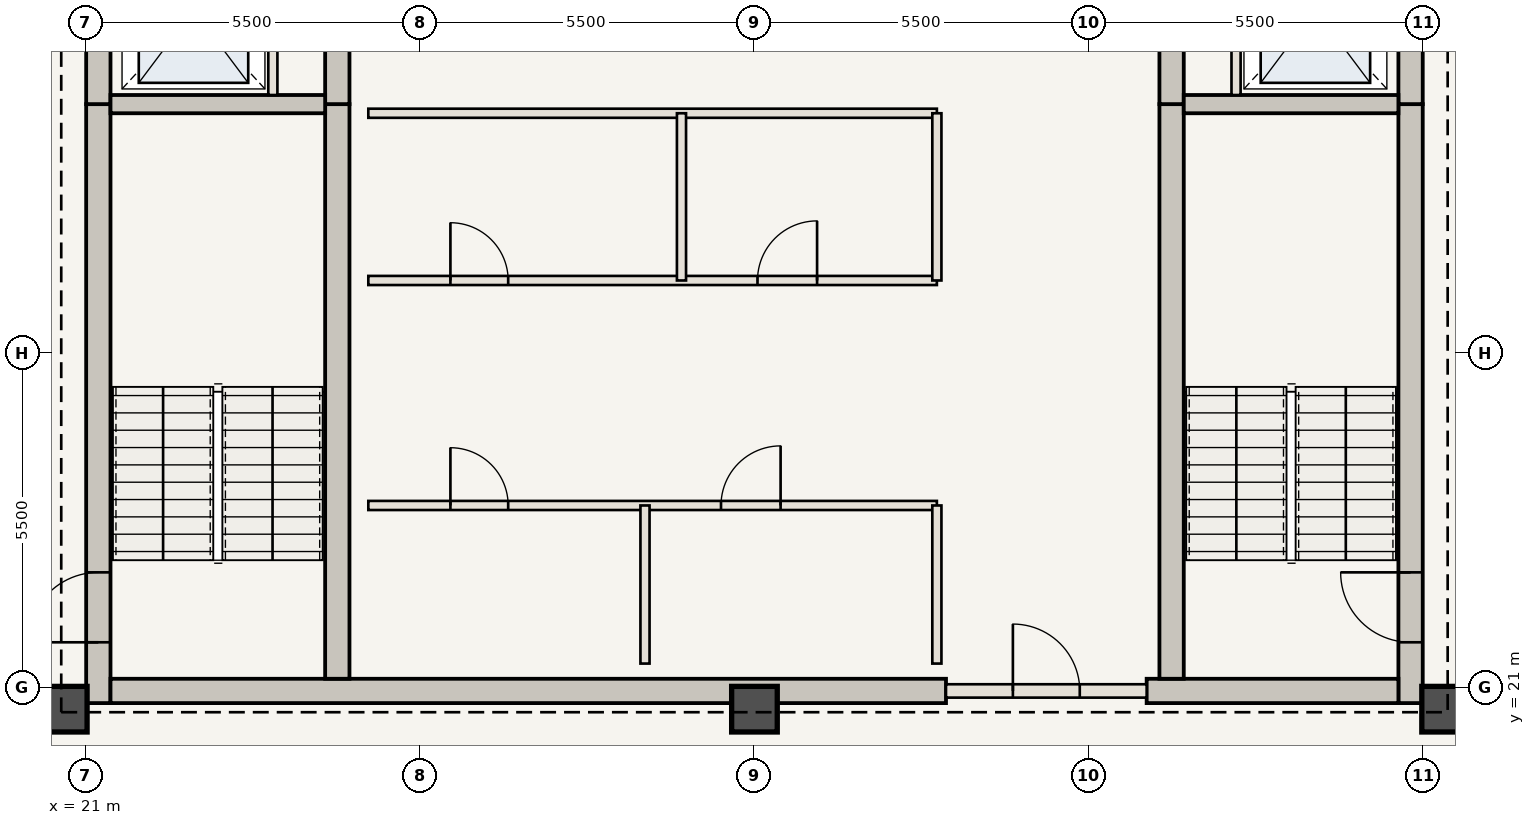
"""IFC4 building model, lengths in metres.
Left out: names, types, materials, properties, quantities, classifications, styles, units other than length and angle.
Written with IfcOpenShell. Run it as: python <this file> out.ifc"""

import sys

from ifc_helpers import new_model, si_unit, direction, frame, frame_2d, origin, origin_2d, place, context, subcontext, project, spatial, rectangle, extrude, element, fill, save


model = new_model("IFC4")
c1 = context("Model", 3, precision=1e-05, world=origin(), true_north=direction((0.0, 1.0)))
c2 = subcontext(c1, "Body", "Model", "MODEL_VIEW")
j1 = project(units=[si_unit("LENGTHUNIT", "METRE"), si_unit("PLANEANGLEUNIT", "RADIAN")], contexts=[c1])
p1 = place(None, origin())
s1 = spatial("IfcSite", under=j1, at=p1, CompositionType="ELEMENT")
p2 = place(p1, origin())
s2 = spatial("IfcBuilding", under=s1, at=p2, CompositionType="ELEMENT")
p3 = place(p2, frame((0.0, 0.0, 262.15)))
s3 = spatial("IfcBuildingStorey", under=s2, at=p3, CompositionType="ELEMENT", Elevation=262.15)
p4 = place(p3, frame((21.21, 20.75, 0.0), z_axis=(0.0, 0.0, 1.0), x_axis=(0.0, 1.0, 0.0)))
e1 = element("IfcWall", 1, at=p4, inside=s3, PredefinedType="SHEAR", context=c2, shape_type="SweptSolid", body=[
    extrude(rectangle(XDim=9.85, YDim=0.4, at=frame_2d((4.925, 0.0))), origin(), (0.0, 0.0, 1.0), 3.85),
])
p5 = place(p4, frame((1.0, 0.0, 0.0)))
e2 = element("IfcOpeningElement", 2, at=p5, cuts=e1, PredefinedType="OPENING", context=c2, shape_type="SweptSolid", body=[
    extrude(rectangle(XDim=1.15, YDim=2.15, at=frame_2d((0.575, 1.075))), frame((0.0, 0.21, 0.0), z_axis=(0.0, -1.0, 0.0), x_axis=(1.0, 0.0, 0.0)), (0.0, 0.0, 1.0), 0.42),
])
p6 = place(p3, frame((21.21, 30.6, 0.0), z_axis=(0.0, 0.0, 1.0), x_axis=(0.0, 1.0, 0.0)))
e3 = element("IfcWall", 3, at=p6, inside=s3, PredefinedType="SHEAR", context=c2, shape_type="SweptSolid", body=[
    extrude(rectangle(XDim=12.6, YDim=0.4, at=frame_2d((6.3, 0.0))), origin(), (0.0, 0.0, 1.0), 3.85),
])
p7 = place(p6, frame((4.2, 0.0, 0.0)))
e4 = element("IfcOpeningElement", 4, at=p7, cuts=e3, PredefinedType="OPENING", context=c2, shape_type="SweptSolid", body=[
    extrude(rectangle(XDim=1.1, YDim=2.15, at=frame_2d((0.55, 1.075))), frame((0.0, 0.21, 0.0), z_axis=(0.0, -1.0, 0.0), x_axis=(1.0, 0.0, 0.0)), (0.0, 0.0, 1.0), 0.42),
])
p8 = place(p6, frame((9.2, 0.0, 0.0)))
e5 = element("IfcOpeningElement", 5, at=p8, cuts=e3, PredefinedType="OPENING", context=c2, shape_type="SweptSolid", body=[
    extrude(rectangle(XDim=0.92, YDim=2.1, at=frame_2d((0.46, 1.05))), frame((0.0, 0.21, 0.0), z_axis=(0.0, -1.0, 0.0), x_axis=(1.0, 0.0, 0.0)), (0.0, 0.0, 1.0), 0.42),
])
p9 = place(p3, frame((42.79, 20.75, 0.0), z_axis=(0.0, 0.0, 1.0), x_axis=(0.0, 1.0, 0.0)))
e6 = element("IfcWall", 6, at=p9, inside=s3, PredefinedType="SHEAR", context=c2, shape_type="SweptSolid", body=[
    extrude(rectangle(XDim=9.85, YDim=0.4, at=frame_2d((4.925, 0.0))), origin(), (0.0, 0.0, 1.0), 3.85),
])
p10 = place(p9, frame((1.0, 0.0, 0.0)))
e7 = element("IfcOpeningElement", 7, at=p10, cuts=e6, PredefinedType="OPENING", context=c2, shape_type="SweptSolid", body=[
    extrude(rectangle(XDim=1.15, YDim=2.15, at=frame_2d((0.575, 1.075))), frame((0.0, 0.21, 0.0), z_axis=(0.0, -1.0, 0.0), x_axis=(1.0, 0.0, 0.0)), (0.0, 0.0, 1.0), 0.42),
])
p11 = place(p3, frame((42.79, 30.6, 0.0), z_axis=(0.0, 0.0, 1.0), x_axis=(0.0, 1.0, 0.0)))
e8 = element("IfcWall", 8, at=p11, inside=s3, PredefinedType="SHEAR", context=c2, shape_type="SweptSolid", body=[
    extrude(rectangle(XDim=12.6, YDim=0.4, at=frame_2d((6.3, 0.0))), origin(), (0.0, 0.0, 1.0), 3.85),
])
p12 = place(p11, frame((4.2, 0.0, 0.0)))
e9 = element("IfcOpeningElement", 9, at=p12, cuts=e8, PredefinedType="OPENING", context=c2, shape_type="SweptSolid", body=[
    extrude(rectangle(XDim=1.1, YDim=2.15, at=frame_2d((0.55, 1.075))), frame((0.0, 0.21, 0.0), z_axis=(0.0, -1.0, 0.0), x_axis=(1.0, 0.0, 0.0)), (0.0, 0.0, 1.0), 0.42),
])
p13 = place(p11, frame((8.4, 0.0, 0.0)))
e10 = element("IfcOpeningElement", 10, at=p13, cuts=e8, PredefinedType="OPENING", context=c2, shape_type="SweptSolid", body=[
    extrude(rectangle(XDim=0.88, YDim=2.1, at=frame_2d((0.44, 1.05))), frame((0.0, 0.21, 0.0), z_axis=(0.0, -1.0, 0.0), x_axis=(1.0, 0.0, 0.0)), (0.0, 0.0, 1.0), 0.42),
])
p14 = place(p11, frame((10.5, 0.0, 0.0)))
e11 = element("IfcOpeningElement", 11, at=p14, cuts=e8, PredefinedType="OPENING", context=c2, shape_type="SweptSolid", body=[
    extrude(rectangle(XDim=0.88, YDim=2.1, at=frame_2d((0.44, 1.05))), frame((0.0, 0.21, 0.0), z_axis=(0.0, -1.0, 0.0), x_axis=(1.0, 0.0, 0.0)), (0.0, 0.0, 1.0), 0.42),
])
p15 = place(p3, frame((21.41, 20.95, 0.0), z_axis=(0.0, 0.0, 1.0), x_axis=(1.0, 0.0, 0.0)))
e12 = element("IfcWall", 12, at=p15, inside=s3, PredefinedType="SHEAR", context=c2, shape_type="SweptSolid", body=[
    extrude(rectangle(XDim=13.74, YDim=0.4, at=frame_2d((6.87, 0.0))), origin(), (0.0, 0.0, 1.0), 3.85),
])
p16 = place(p3, frame((38.45, 20.95, 0.0), z_axis=(0.0, 0.0, 1.0), x_axis=(1.0, 0.0, 0.0)))
e13 = element("IfcWall", 13, at=p16, inside=s3, PredefinedType="SHEAR", context=c2, shape_type="SweptSolid", body=[
    extrude(rectangle(XDim=4.14, YDim=0.4, at=frame_2d((2.07, 0.0))), origin(), (0.0, 0.0, 1.0), 3.85),
])
p17 = place(p3, frame((25.14, 21.15, 0.0), z_axis=(0.0, 0.0, 1.0), x_axis=(0.0, 1.0, 0.0)))
e14 = element("IfcWall", 14, at=p17, inside=s3, PredefinedType="SHEAR", context=c2, shape_type="SweptSolid", body=[
    extrude(rectangle(XDim=9.45, YDim=0.4, at=frame_2d((4.725, 0.0))), origin(), (0.0, 0.0, 1.0), 3.85),
])
p18 = place(p3, frame((25.14, 30.6, 0.0), z_axis=(0.0, 0.0, 1.0), x_axis=(0.0, 1.0, 0.0)))
e15 = element("IfcWall", 15, at=p18, inside=s3, PredefinedType="SHEAR", context=c2, shape_type="SweptSolid", body=[
    extrude(rectangle(XDim=12.2, YDim=0.4, at=frame_2d((6.1, 0.0))), origin(), (0.0, 0.0, 1.0), 3.85),
])
p19 = place(p18, frame((6.25, 0.0, 0.0)))
e16 = element("IfcOpeningElement", 16, at=p19, cuts=e15, PredefinedType="OPENING", context=c2, shape_type="SweptSolid", body=[
    extrude(rectangle(XDim=1.1, YDim=2.15, at=frame_2d((0.55, 1.075))), frame((0.0, 0.21, 0.0), z_axis=(0.0, -1.0, 0.0), x_axis=(1.0, 0.0, 0.0)), (0.0, 0.0, 1.0), 0.42),
])
p20 = place(p3, frame((38.86, 21.15, 0.0), z_axis=(0.0, 0.0, 1.0), x_axis=(0.0, 1.0, 0.0)))
e17 = element("IfcWall", 17, at=p20, inside=s3, PredefinedType="SHEAR", context=c2, shape_type="SweptSolid", body=[
    extrude(rectangle(XDim=9.45, YDim=0.4, at=frame_2d((4.725, 0.0))), origin(), (0.0, 0.0, 1.0), 3.85),
])
p21 = place(p3, frame((38.86, 30.6, 0.0), z_axis=(0.0, 0.0, 1.0), x_axis=(0.0, 1.0, 0.0)))
e18 = element("IfcWall", 18, at=p21, inside=s3, PredefinedType="SHEAR", context=c2, shape_type="SweptSolid", body=[
    extrude(rectangle(XDim=12.2, YDim=0.4, at=frame_2d((6.1, 0.0))), origin(), (0.0, 0.0, 1.0), 3.85),
])
for number, where, z_axis, x_axis in (
    (19, (20.65, 20.65, 0.0), (0.0, 0.0, 1.0), (1.0, 0.0, 0.0)),
    (20, (32.0, 20.65, 0.0), (0.0, 0.0, 1.0), (1.0, 0.0, 0.0)),
    (21, (43.35, 20.65, 0.0), (0.0, 0.0, 1.0), (1.0, 0.0, 0.0)),
):
    element("IfcColumn", number, at=place(p3, frame(where, z_axis=z_axis, x_axis=x_axis)), inside=s3, PredefinedType="COLUMN", context=c2, shape_type="SweptSolid", body=[
        extrude(rectangle(XDim=0.75, YDim=0.75, at=origin_2d()), origin(), (0.0, 0.0, 1.0), 3.85),
    ])
for number, where, z_axis, x_axis in (
    (22, (21.41, 30.6, 0.0), (0.0, 0.0, 1.0), (1.0, 0.0, 0.0)),
    (23, (39.06, 30.6, 0.0), (0.0, 0.0, 1.0), (1.0, 0.0, 0.0)),
):
    element("IfcWall", number, at=place(p3, frame(where, z_axis=z_axis, x_axis=x_axis)), inside=s3, PredefinedType="SHEAR", context=c2, shape_type="SweptSolid", body=[
        extrude(rectangle(XDim=3.53, YDim=0.3, at=frame_2d((1.765, 0.0))), origin(), (0.0, 0.0, 1.0), 3.43),
    ])
for number, where, z_axis, x_axis in (
    (24, (24.08, 30.75, 0.0), (0.0, 0.0, 1.0), (0.0, 1.0, 0.0)),
    (25, (39.92, 30.75, 0.0), (0.0, 0.0, 1.0), (0.0, 1.0, 0.0)),
):
    element("IfcWall", number, at=place(p3, frame(where, z_axis=z_axis, x_axis=x_axis)), inside=s3, PredefinedType="STANDARD", context=c2, shape_type="SweptSolid", body=[
        extrude(rectangle(XDim=2.65, YDim=0.15, at=frame_2d((1.325, 0.0))), origin(), (0.0, 0.0, 1.0), 3.43),
    ])
p22 = place(p3, frame((35.15, 20.95, 0.0), z_axis=(0.0, 0.0, 1.0), x_axis=(1.0, 0.0, 0.0)))
e26 = element("IfcWall", 26, at=p22, inside=s3, PredefinedType="STANDARD", context=c2, shape_type="SweptSolid", body=[
    extrude(rectangle(XDim=3.3, YDim=0.22, at=frame_2d((1.65, 0.0))), origin(), (0.0, 0.0, 1.0), 3.43),
])
p23 = place(p22, frame((1.1, 0.0, 0.0)))
e27 = element("IfcOpeningElement", 27, at=p23, cuts=e26, PredefinedType="OPENING", context=c2, shape_type="SweptSolid", body=[
    extrude(rectangle(XDim=1.1, YDim=2.15, at=frame_2d((0.55, 1.075))), frame((0.0, 0.12, 0.0), z_axis=(0.0, -1.0, 0.0), x_axis=(1.0, 0.0, 0.0)), (0.0, 0.0, 1.0), 0.24),
])
p24 = place(p3, frame((25.65, 24.0, 0.0), z_axis=(0.0, 0.0, 1.0), x_axis=(1.0, 0.0, 0.0)))
e28 = element("IfcWall", 28, at=p24, inside=s3, PredefinedType="STANDARD", context=c2, shape_type="SweptSolid", body=[
    extrude(rectangle(XDim=9.35, YDim=0.15, at=frame_2d((4.675, 0.0))), origin(), (0.0, 0.0, 1.0), 3.43),
])
p25 = place(p24, frame((1.35, 0.0, 0.0)))
e29 = element("IfcOpeningElement", 29, at=p25, cuts=e28, PredefinedType="OPENING", context=c2, shape_type="SweptSolid", body=[
    extrude(rectangle(XDim=0.95, YDim=2.15, at=frame_2d((0.475, 1.075))), frame((0.0, 0.085, 0.0), z_axis=(0.0, -1.0, 0.0), x_axis=(1.0, 0.0, 0.0)), (0.0, 0.0, 1.0), 0.17),
])
p26 = place(p24, frame((5.8, 0.0, 0.0)))
e30 = element("IfcOpeningElement", 30, at=p26, cuts=e28, PredefinedType="OPENING", context=c2, shape_type="SweptSolid", body=[
    extrude(rectangle(XDim=0.98, YDim=2.2, at=frame_2d((0.49, 1.1))), frame((0.0, 0.085, 0.0), z_axis=(0.0, -1.0, 0.0), x_axis=(1.0, 0.0, 0.0)), (0.0, 0.0, 1.0), 0.17),
])
for number, where, z_axis, x_axis in (
    (31, (30.2, 21.4, 0.0), (0.0, 0.0, 1.0), (0.0, 1.0, 0.0)),
    (32, (35.0, 21.4, 0.0), (0.0, 0.0, 1.0), (0.0, 1.0, 0.0)),
):
    element("IfcWall", number, at=place(p3, frame(where, z_axis=z_axis, x_axis=x_axis)), inside=s3, PredefinedType="STANDARD", context=c2, shape_type="SweptSolid", body=[
        extrude(rectangle(XDim=2.6, YDim=0.15, at=frame_2d((1.3, 0.0))), origin(), (0.0, 0.0, 1.0), 3.43),
    ])
p27 = place(p3, frame((25.65, 27.7, 0.0), z_axis=(0.0, 0.0, 1.0), x_axis=(1.0, 0.0, 0.0)))
e33 = element("IfcWall", 33, at=p27, inside=s3, PredefinedType="STANDARD", context=c2, shape_type="SweptSolid", body=[
    extrude(rectangle(XDim=9.35, YDim=0.15, at=frame_2d((4.675, 0.0))), origin(), (0.0, 0.0, 1.0), 3.43),
])
p28 = place(p27, frame((1.35, 0.0, 0.0)))
e34 = element("IfcOpeningElement", 34, at=p28, cuts=e33, PredefinedType="OPENING", context=c2, shape_type="SweptSolid", body=[
    extrude(rectangle(XDim=0.95, YDim=2.15, at=frame_2d((0.475, 1.075))), frame((0.0, 0.085, 0.0), z_axis=(0.0, -1.0, 0.0), x_axis=(1.0, 0.0, 0.0)), (0.0, 0.0, 1.0), 0.17),
])
p29 = place(p27, frame((6.4, 0.0, 0.0)))
e35 = element("IfcOpeningElement", 35, at=p29, cuts=e33, PredefinedType="OPENING", context=c2, shape_type="SweptSolid", body=[
    extrude(rectangle(XDim=0.98, YDim=2.2, at=frame_2d((0.49, 1.1))), frame((0.0, 0.085, 0.0), z_axis=(0.0, -1.0, 0.0), x_axis=(1.0, 0.0, 0.0)), (0.0, 0.0, 1.0), 0.17),
])
p30 = place(p3, frame((25.65, 30.45, 0.0), z_axis=(0.0, 0.0, 1.0), x_axis=(1.0, 0.0, 0.0)))
e36 = element("IfcWall", 36, at=p30, inside=s3, PredefinedType="STANDARD", context=c2, shape_type="SweptSolid", body=[
    extrude(rectangle(XDim=9.35, YDim=0.15, at=frame_2d((4.675, 0.0))), origin(), (0.0, 0.0, 1.0), 3.43),
])
for number, where, z_axis, x_axis in (
    (37, (30.8, 27.7, 0.0), (0.0, 0.0, 1.0), (0.0, 1.0, 0.0)),
    (38, (35.0, 27.7, 0.0), (0.0, 0.0, 1.0), (0.0, 1.0, 0.0)),
):
    element("IfcWall", number, at=place(p3, frame(where, z_axis=z_axis, x_axis=x_axis)), inside=s3, PredefinedType="STANDARD", context=c2, shape_type="SweptSolid", body=[
        extrude(rectangle(XDim=2.75, YDim=0.15, at=frame_2d((1.375, 0.0))), origin(), (0.0, 0.0, 1.0), 3.43),
    ])
p31 = place(p5, origin())
e39 = element("IfcDoor", 39, at=p31, inside=s3, OperationType="SINGLE_SWING_LEFT", PredefinedType="DOOR", context=c2, shape_type="SweptSolid", body=[
    extrude(rectangle(XDim=1.15, YDim=2.15, at=frame_2d((0.575, 1.075))), frame((0.0, 0.025, 0.0), z_axis=(0.0, -1.0, 0.0), x_axis=(1.0, 0.0, 0.0)), (0.0, 0.0, 1.0), 0.05),
])
fill(e2, e39)
p32 = place(p10, origin())
e40 = element("IfcDoor", 40, at=p32, inside=s3, OperationType="SINGLE_SWING_RIGHT", PredefinedType="DOOR", context=c2, shape_type="SweptSolid", body=[
    extrude(rectangle(XDim=1.15, YDim=2.15, at=frame_2d((0.575, 1.075))), frame((0.0, 0.025, 0.0), z_axis=(0.0, -1.0, 0.0), x_axis=(1.0, 0.0, 0.0)), (0.0, 0.0, 1.0), 0.05),
])
fill(e7, e40)
p33 = place(p23, origin())
e41 = element("IfcDoor", 41, at=p33, inside=s3, OperationType="SINGLE_SWING_LEFT", PredefinedType="DOOR", context=c2, shape_type="SweptSolid", body=[
    extrude(rectangle(XDim=1.1, YDim=2.15, at=frame_2d((0.55, 1.075))), frame((0.0, 0.025, 0.0), z_axis=(0.0, -1.0, 0.0), x_axis=(1.0, 0.0, 0.0)), (0.0, 0.0, 1.0), 0.05),
])
fill(e27, e41)
p34 = place(p25, origin())
e42 = element("IfcDoor", 42, at=p34, inside=s3, OperationType="SINGLE_SWING_LEFT", PredefinedType="DOOR", context=c2, shape_type="SweptSolid", body=[
    extrude(rectangle(XDim=0.95, YDim=2.15, at=frame_2d((0.475, 1.075))), frame((0.0, 0.025, 0.0), z_axis=(0.0, -1.0, 0.0), x_axis=(1.0, 0.0, 0.0)), (0.0, 0.0, 1.0), 0.05),
])
fill(e29, e42)
p35 = place(p26, origin())
e43 = element("IfcDoor", 43, at=p35, inside=s3, OperationType="SINGLE_SWING_RIGHT", PredefinedType="DOOR", context=c2, shape_type="SweptSolid", body=[
    extrude(rectangle(XDim=0.98, YDim=2.2, at=frame_2d((0.49, 1.1))), frame((0.0, 0.025, 0.0), z_axis=(0.0, -1.0, 0.0), x_axis=(1.0, 0.0, 0.0)), (0.0, 0.0, 1.0), 0.05),
])
fill(e30, e43)
p36 = place(p28, origin())
e44 = element("IfcDoor", 44, at=p36, inside=s3, OperationType="SINGLE_SWING_LEFT", PredefinedType="DOOR", context=c2, shape_type="SweptSolid", body=[
    extrude(rectangle(XDim=0.95, YDim=2.15, at=frame_2d((0.475, 1.075))), frame((0.0, 0.025, 0.0), z_axis=(0.0, -1.0, 0.0), x_axis=(1.0, 0.0, 0.0)), (0.0, 0.0, 1.0), 0.05),
])
fill(e34, e44)
p37 = place(p29, origin())
e45 = element("IfcDoor", 45, at=p37, inside=s3, OperationType="SINGLE_SWING_RIGHT", PredefinedType="DOOR", context=c2, shape_type="SweptSolid", body=[
    extrude(rectangle(XDim=0.98, YDim=2.2, at=frame_2d((0.49, 1.1))), frame((0.0, 0.025, 0.0), z_axis=(0.0, -1.0, 0.0), x_axis=(1.0, 0.0, 0.0)), (0.0, 0.0, 1.0), 0.05),
])
fill(e35, e45)
save(model, sys.argv[1])
